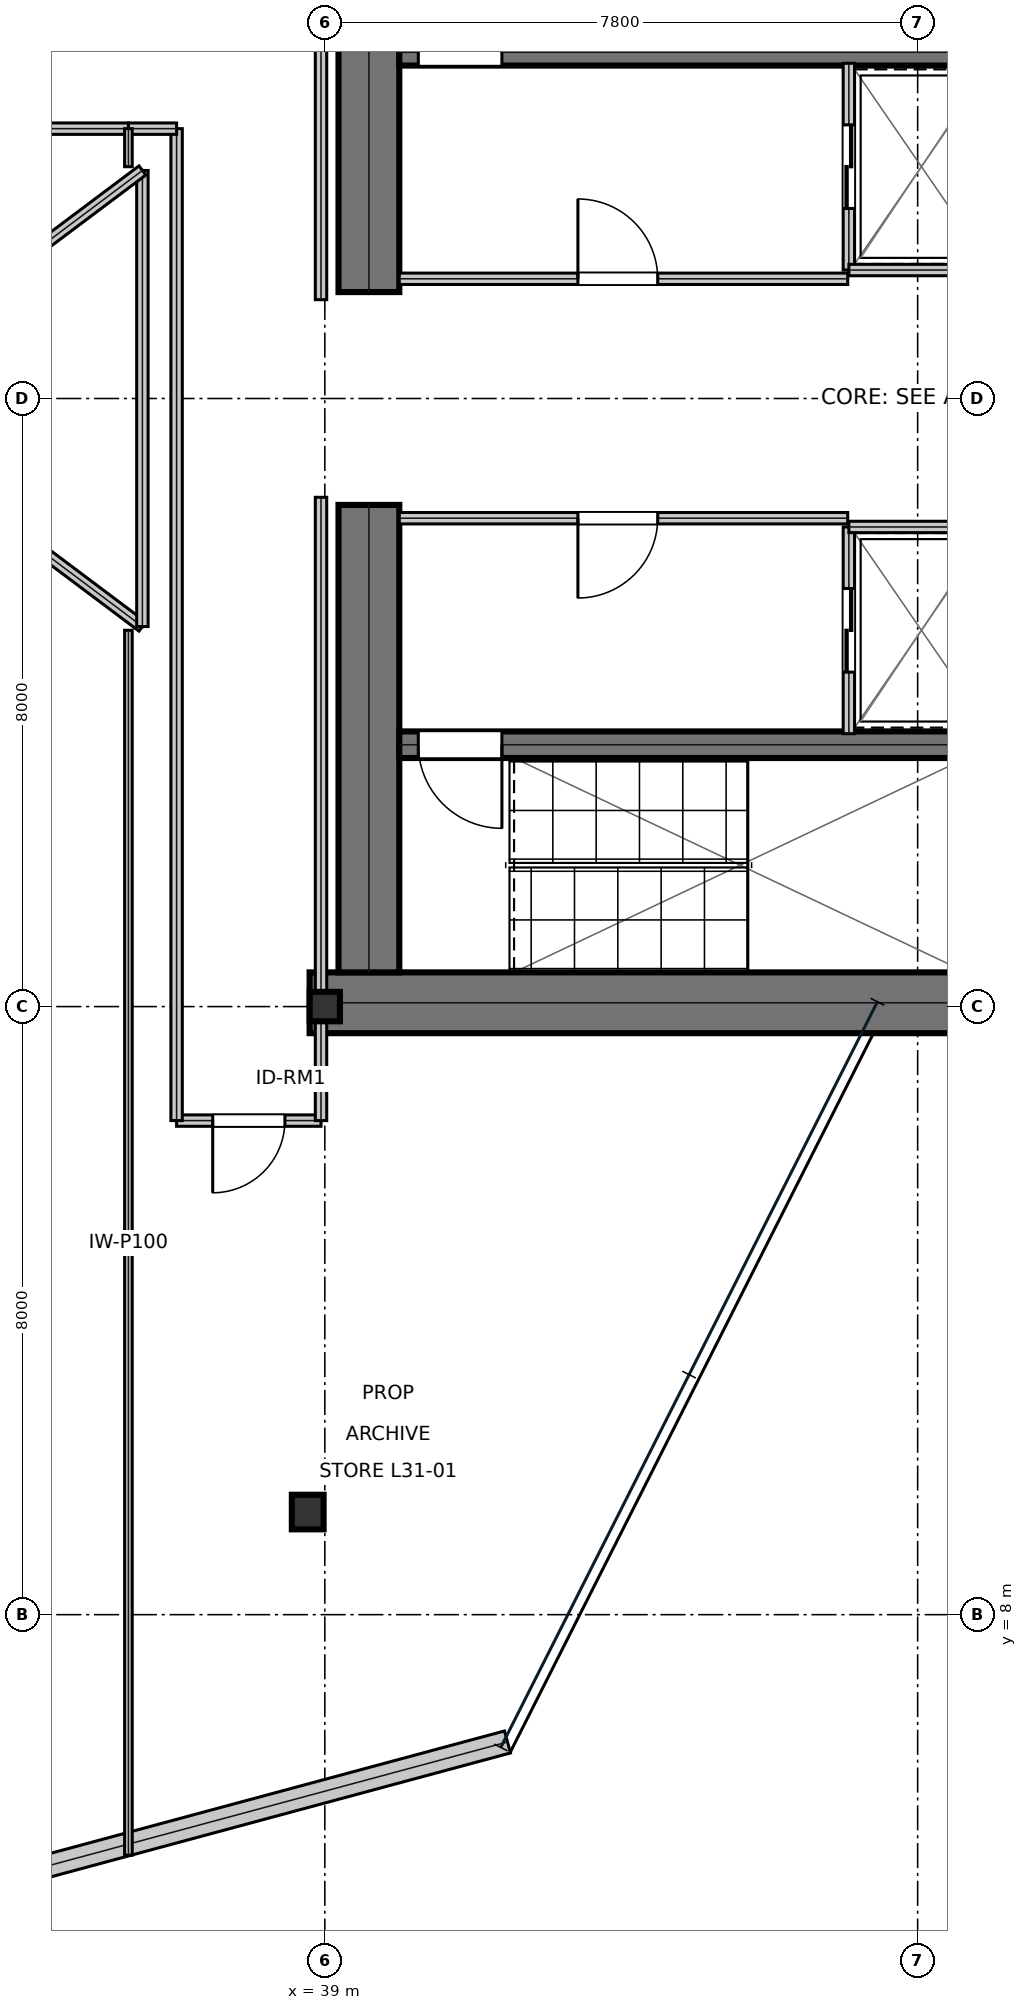
"""IFC4 building model, lengths in metres.
Left out: names, types, materials, properties, quantities, classifications, styles, units other than length and angle.
Written with IfcOpenShell. Run it as: python <this file> out.ifc"""

import sys

from ifc_helpers import new_model, si_unit, direction, frame, frame_2d, origin, origin_2d, place, context, subcontext, project, spatial, rectangle, i_section, extrude, element, fill, save


model = new_model("IFC4")
c1 = context("Model", 3, precision=1e-05, world=origin(), true_north=direction((0.0, 1.0)))
c2 = subcontext(c1, "Body", "Model", "MODEL_VIEW")
j1 = project(units=[si_unit("LENGTHUNIT", "METRE"), si_unit("PLANEANGLEUNIT", "RADIAN")], contexts=[c1])
p1 = place(None, origin())
s1 = spatial("IfcSite", under=j1, at=p1, CompositionType="ELEMENT")
p2 = place(p1, origin())
s2 = spatial("IfcBuilding", under=s1, at=p2, CompositionType="ELEMENT")
p3 = place(p2, frame((0.0, 0.0, 137.1)))
s3 = spatial("IfcBuildingStorey", under=s2, at=p3, CompositionType="ELEMENT", Elevation=137.1)
p4 = place(p3, frame((38.8, 16.05, 0.0), z_axis=(0.0, 0.0, 1.0), x_axis=(1.0, 0.0, 0.0)))
e1 = element("IfcWall", 1, at=p4, inside=s3, PredefinedType="SHEAR", context=c2, shape_type="SweptSolid", body=[
    extrude(rectangle(XDim=16.0, YDim=0.8, at=frame_2d((8.0, 0.0))), origin(), (0.0, 0.0, 1.0), 3.81),
])
for number, where, z_axis, x_axis in (
    (2, (39.58, 16.45, 0.0), (0.0, 0.0, 1.0), (0.0, 1.0, 0.0)),
    (3, (39.58, 25.4, 0.0), (0.0, 0.0, 1.0), (0.0, 1.0, 0.0)),
):
    element("IfcWall", number, at=place(p3, frame(where, z_axis=z_axis, x_axis=x_axis)), inside=s3, PredefinedType="SHEAR", context=c2, shape_type="SweptSolid", body=[
        extrude(rectangle(XDim=6.15, YDim=0.8, at=frame_2d((3.075, 0.0))), origin(), (0.0, 0.0, 1.0), 3.81),
    ])
p5 = place(p3, frame((39.98, 28.555, 0.0), z_axis=(0.0, 0.0, 1.0), x_axis=(1.0, 0.0, 0.0)))
e4 = element("IfcWall", 4, at=p5, inside=s3, PredefinedType="SHEAR", context=c2, shape_type="SweptSolid", body=[
    extrude(rectangle(XDim=7.71, YDim=0.35, at=frame_2d((3.855, 0.0))), origin(), (0.0, 0.0, 1.0), 3.81),
])
p6 = place(p5, frame((0.25, 0.0, 0.0)))
e5 = element("IfcOpeningElement", 5, at=p6, cuts=e4, PredefinedType="OPENING", context=c2, shape_type="SweptSolid", body=[
    extrude(rectangle(XDim=1.1, YDim=2.15, at=frame_2d((0.55, 1.075))), frame((0.0, 0.185, 0.0), z_axis=(0.0, -1.0, 0.0), x_axis=(1.0, 0.0, 0.0)), (0.0, 0.0, 1.0), 0.37),
])
p7 = place(p3, frame((39.98, 19.445, 0.0), z_axis=(0.0, 0.0, 1.0), x_axis=(1.0, 0.0, 0.0)))
e6 = element("IfcWall", 6, at=p7, inside=s3, PredefinedType="SHEAR", context=c2, shape_type="SweptSolid", body=[
    extrude(rectangle(XDim=7.71, YDim=0.35, at=frame_2d((3.855, 0.0))), origin(), (0.0, 0.0, 1.0), 3.81),
])
p8 = place(p7, frame((0.25, 0.0, 0.0)))
e7 = element("IfcOpeningElement", 7, at=p8, cuts=e6, PredefinedType="OPENING", context=c2, shape_type="SweptSolid", body=[
    extrude(rectangle(XDim=1.1, YDim=2.15, at=frame_2d((0.55, 1.075))), frame((0.0, 0.185, 0.0), z_axis=(0.0, -1.0, 0.0), x_axis=(1.0, 0.0, 0.0)), (0.0, 0.0, 1.0), 0.37),
])
p9 = place(p3, frame((39.0, 16.0, 0.0), z_axis=(0.0, 0.0, 1.0), x_axis=(1.0, 0.0, 0.0)))
e8 = element("IfcColumn", 8, at=p9, inside=s3, PredefinedType="COLUMN", context=c2, shape_type="SweptSolid", body=[
    extrude(i_section(OverallWidth=0.398, OverallDepth=0.387, WebThickness=0.021, FlangeThickness=0.033, at=origin_2d()), origin(), (0.0, 0.0, 1.0), 4.044),
])
p10 = place(p3, frame((38.775, 9.35, 0.016), z_axis=(-0.006193166635, 0.037280434452, 0.9992856518), x_axis=(-0.986480631929, -0.163877889995, 0.0)))
e9 = element("IfcColumn", 9, at=p10, inside=s3, PredefinedType="COLUMN", context=c2, shape_type="SweptSolid", body=[
    extrude(i_section(OverallWidth=0.418, OverallDepth=0.455, WebThickness=0.042, FlangeThickness=0.068, at=origin_2d()), origin(), (0.0, 0.0, 1.0), 4.021),
])
p11 = place(p3, frame((35.079, 4.62, 0.0), z_axis=(0.0, 0.0, 1.0), x_axis=(0.965531145086, 0.260287548434, 0.0)))
e10 = element("IfcWall", 10, at=p11, inside=s3, PredefinedType="STANDARD", context=c2, shape_type="SweptSolid", body=[
    extrude(rectangle(XDim=6.551, YDim=0.3, at=frame_2d((3.275, 0.0))), origin(), (0.0, 0.0, 1.0), 3.81),
])
p12 = place(p3, frame((39.98, 25.575, 0.0), z_axis=(0.0, 0.0, 1.0), x_axis=(1.0, 0.0, 0.0)))
e11 = element("IfcWall", 11, at=p12, inside=s3, PredefinedType="PARTITIONING", context=c2, shape_type="SweptSolid", body=[
    extrude(rectangle(XDim=5.9, YDim=0.15, at=frame_2d((2.95, 0.0))), origin(), (0.0, 0.0, 1.0), 3.81),
])
p13 = place(p12, frame((2.35, 0.0, 0.0)))
e12 = element("IfcOpeningElement", 12, at=p13, cuts=e11, PredefinedType="OPENING", context=c2, shape_type="SweptSolid", body=[
    extrude(rectangle(XDim=1.05, YDim=2.15, at=frame_2d((0.525, 1.075))), frame((0.0, 0.085, 0.0), z_axis=(0.0, -1.0, 0.0), x_axis=(1.0, 0.0, 0.0)), (0.0, 0.0, 1.0), 0.17),
])
p14 = place(p3, frame((39.98, 22.425, 0.0), z_axis=(0.0, 0.0, 1.0), x_axis=(1.0, 0.0, 0.0)))
e13 = element("IfcWall", 13, at=p14, inside=s3, PredefinedType="PARTITIONING", context=c2, shape_type="SweptSolid", body=[
    extrude(rectangle(XDim=5.9, YDim=0.15, at=frame_2d((2.95, 0.0))), origin(), (0.0, 0.0, 1.0), 3.81),
])
p15 = place(p14, frame((2.35, 0.0, 0.0)))
e14 = element("IfcOpeningElement", 14, at=p15, cuts=e13, PredefinedType="OPENING", context=c2, shape_type="SweptSolid", body=[
    extrude(rectangle(XDim=1.05, YDim=2.15, at=frame_2d((0.525, 1.075))), frame((0.0, 0.085, 0.0), z_axis=(0.0, -1.0, 0.0), x_axis=(1.0, 0.0, 0.0)), (0.0, 0.0, 1.0), 0.17),
])
p16 = place(p3, frame((45.895, 25.69, 0.0), z_axis=(0.0, 0.0, 1.0), x_axis=(0.0, 1.0, 0.0)))
e15 = element("IfcWall", 15, at=p16, inside=s3, PredefinedType="PARTITIONING", context=c2, shape_type="SweptSolid", body=[
    extrude(rectangle(XDim=2.72, YDim=0.15, at=frame_2d((1.36, 0.0))), origin(), (0.0, 0.0, 1.0), 3.81),
])
p17 = place(p16, frame((0.81, 0.0, 0.0)))
e16 = element("IfcOpeningElement", 16, at=p17, cuts=e15, PredefinedType="OPENING", context=c2, shape_type="SweptSolid", body=[
    extrude(rectangle(XDim=1.1, YDim=2.15, at=frame_2d((0.55, 1.075))), frame((0.0, 0.085, 0.0), z_axis=(0.0, -1.0, 0.0), x_axis=(1.0, 0.0, 0.0)), (0.0, 0.0, 1.0), 0.17),
])
p18 = place(p3, frame((45.895, 25.69, 0.0), z_axis=(0.0, 0.0, 1.0), x_axis=(1.0, 0.0, 0.0)))
e17 = element("IfcWall", 17, at=p18, inside=s3, PredefinedType="PARTITIONING", context=c2, shape_type="SweptSolid", body=[
    extrude(rectangle(XDim=1.915, YDim=0.15, at=frame_2d((0.958, 0.0))), origin(), (0.0, 0.0, 1.0), 3.81),
])
p19 = place(p3, frame((45.895, 19.59, 0.0), z_axis=(0.0, 0.0, 1.0), x_axis=(0.0, 1.0, 0.0)))
e18 = element("IfcWall", 18, at=p19, inside=s3, PredefinedType="PARTITIONING", context=c2, shape_type="SweptSolid", body=[
    extrude(rectangle(XDim=2.72, YDim=0.15, at=frame_2d((1.36, 0.0))), origin(), (0.0, 0.0, 1.0), 3.81),
])
p20 = place(p19, frame((0.81, 0.0, 0.0)))
e19 = element("IfcOpeningElement", 19, at=p20, cuts=e18, PredefinedType="OPENING", context=c2, shape_type="SweptSolid", body=[
    extrude(rectangle(XDim=1.1, YDim=2.15, at=frame_2d((0.55, 1.075))), frame((0.0, 0.085, 0.0), z_axis=(0.0, -1.0, 0.0), x_axis=(1.0, 0.0, 0.0)), (0.0, 0.0, 1.0), 0.17),
])
p21 = place(p3, frame((45.895, 22.31, 0.0), z_axis=(0.0, 0.0, 1.0), x_axis=(1.0, 0.0, 0.0)))
e20 = element("IfcWall", 20, at=p21, inside=s3, PredefinedType="PARTITIONING", context=c2, shape_type="SweptSolid", body=[
    extrude(rectangle(XDim=1.915, YDim=0.15, at=frame_2d((0.958, 0.0))), origin(), (0.0, 0.0, 1.0), 3.81),
])
p22 = place(p3, frame((37.05, 14.5, 0.0), z_axis=(0.0, 0.0, 1.0), x_axis=(1.0, 0.0, 0.0)))
e21 = element("IfcWall", 21, at=p22, inside=s3, PredefinedType="PARTITIONING", context=c2, shape_type="SweptSolid", body=[
    extrude(rectangle(XDim=1.9, YDim=0.15, at=frame_2d((0.95, 0.0))), origin(), (0.0, 0.0, 1.0), 3.19),
])
p23 = place(p22, frame((0.475, 0.0, 0.0)))
e22 = element("IfcOpeningElement", 22, at=p23, cuts=e21, PredefinedType="OPENING", context=c2, shape_type="SweptSolid", body=[
    extrude(rectangle(XDim=0.95, YDim=2.15, at=frame_2d((0.475, 1.075))), frame((0.0, 0.085, 0.0), z_axis=(0.0, -1.0, 0.0), x_axis=(1.0, 0.0, 0.0)), (0.0, 0.0, 1.0), 0.17),
])
p24 = place(p3, frame((37.05, 14.5, 0.0), z_axis=(0.0, 0.0, 1.0), x_axis=(0.0, 1.0, 0.0)))
e23 = element("IfcWall", 23, at=p24, inside=s3, PredefinedType="PARTITIONING", context=c2, shape_type="SweptSolid", body=[
    extrude(rectangle(XDim=13.05, YDim=0.15, at=frame_2d((6.525, 0.0))), origin(), (0.0, 0.0, 1.0), 3.19),
])
p25 = place(p3, frame((38.95, 14.5, 0.0), z_axis=(0.0, 0.0, 1.0), x_axis=(0.0, 1.0, 0.0)))
e24 = element("IfcWall", 24, at=p25, inside=s3, PredefinedType="PARTITIONING", context=c2, shape_type="SweptSolid", body=[
    extrude(rectangle(XDim=8.2, YDim=0.15, at=frame_2d((4.1, 0.0))), origin(), (0.0, 0.0, 1.0), 3.19),
])
p26 = place(p3, frame((36.416, 27.55, 0.0), z_axis=(0.0, 0.0, 1.0), x_axis=(1.0, 0.0, 0.0)))
e25 = element("IfcWall", 25, at=p26, inside=s3, PredefinedType="PARTITIONING", context=c2, shape_type="SweptSolid", body=[
    extrude(rectangle(XDim=0.634, YDim=0.15, at=frame_2d((0.317, 0.0))), origin(), (0.0, 0.0, 1.0), 3.443),
])
p27 = place(p3, frame((29.4, 27.55, 0.0), z_axis=(0.0, 0.0, 1.0), x_axis=(1.0, 0.0, 0.0)))
e26 = element("IfcWall", 26, at=p27, inside=s3, PredefinedType="PARTITIONING", context=c2, shape_type="SweptSolid", body=[
    extrude(rectangle(XDim=7.016, YDim=0.15, at=frame_2d((3.508, 0.0))), origin(), (0.0, 0.0, 1.0), 3.19),
])
p28 = place(p3, frame((38.95, 25.3, 0.0), z_axis=(0.0, 0.0, 1.0), x_axis=(0.0, 1.0, 0.0)))
e27 = element("IfcWall", 27, at=p28, inside=s3, PredefinedType="PARTITIONING", context=c2, shape_type="SweptSolid", body=[
    extrude(rectangle(XDim=8.2, YDim=0.15, at=frame_2d((4.1, 0.0))), origin(), (0.0, 0.0, 1.0), 3.19),
])
p29 = place(p3, frame((36.416, 4.836, 0.0), z_axis=(0.0, 0.0, 1.0), x_axis=(0.0, 1.0, 0.0)))
e28 = element("IfcWall", 28, at=p29, inside=s3, PredefinedType="PARTITIONING", context=c2, shape_type="SweptSolid", body=[
    extrude(rectangle(XDim=16.115, YDim=0.1, at=frame_2d((8.057, 0.0))), origin(), (0.0, 0.0, 1.0), 3.19),
])
p30 = place(p3, frame((36.416, 27.05, 0.0), z_axis=(0.0, 0.0, 1.0), x_axis=(0.0, 1.0, 0.0)))
e29 = element("IfcWall", 29, at=p30, inside=s3, PredefinedType="PARTITIONING", context=c2, shape_type="SweptSolid", body=[
    extrude(rectangle(XDim=0.5, YDim=0.1, at=frame_2d((0.25, 0.0))), origin(), (0.0, 0.0, 1.0), 3.81),
])
p31 = place(p3, frame((32.6, 24.0, 0.0), z_axis=(0.0, 0.0, 1.0), x_axis=(0.8, -0.6, 0.0)))
e30 = element("IfcWall", 30, at=p31, inside=s3, PredefinedType="MOVABLE", context=c2, shape_type="SweptSolid", body=[
    extrude(rectangle(XDim=5.0, YDim=0.15, at=frame_2d((2.5, 0.0))), origin(), (0.0, 0.0, 1.0), 3.81),
])
p32 = place(p3, frame((36.6, 21.0, 0.0), z_axis=(0.0, 0.0, 1.0), x_axis=(0.0, 1.0, 0.0)))
e31 = element("IfcWall", 31, at=p32, inside=s3, PredefinedType="MOVABLE", context=c2, shape_type="SweptSolid", body=[
    extrude(rectangle(XDim=6.0, YDim=0.15, at=frame_2d((3.0, 0.0))), origin(), (0.0, 0.0, 1.0), 3.81),
])
p33 = place(p3, frame((36.6, 27.0, 0.0), z_axis=(0.0, 0.0, 1.0), x_axis=(-0.8, -0.6, 0.0)))
e32 = element("IfcWall", 32, at=p33, inside=s3, PredefinedType="MOVABLE", context=c2, shape_type="SweptSolid", body=[
    extrude(rectangle(XDim=5.0, YDim=0.15, at=frame_2d((2.5, 0.0))), origin(), (0.0, 0.0, 1.0), 3.81),
])
p34 = place(p13, origin())
e33 = element("IfcDoor", 33, at=p34, inside=s3, OperationType="SINGLE_SWING_LEFT", PredefinedType="DOOR", context=c2, shape_type="SweptSolid", body=[
    extrude(rectangle(XDim=1.05, YDim=2.15, at=frame_2d((0.525, 1.075))), frame((0.0, 0.025, 0.0), z_axis=(0.0, -1.0, 0.0), x_axis=(1.0, 0.0, 0.0)), (0.0, 0.0, 1.0), 0.05),
])
fill(e12, e33)
p35 = place(p15, frame((1.05, 0.0, 0.0), z_axis=(0.0, 0.0, 1.0), x_axis=(-1.0, 0.0, 0.0)))
e34 = element("IfcDoor", 34, at=p35, inside=s3, OperationType="SINGLE_SWING_RIGHT", PredefinedType="DOOR", context=c2, shape_type="SweptSolid", body=[
    extrude(rectangle(XDim=1.05, YDim=2.15, at=frame_2d((0.525, 1.075))), frame((0.0, 0.025, 0.0), z_axis=(0.0, -1.0, 0.0), x_axis=(1.0, 0.0, 0.0)), (0.0, 0.0, 1.0), 0.05),
])
fill(e14, e34)
p36 = place(p17, frame((1.1, 0.0, 0.0), z_axis=(0.0, 0.0, 1.0), x_axis=(-1.0, 0.0, 0.0)))
e35 = element("IfcDoor", 35, at=p36, inside=s3, OperationType="DOUBLE_DOOR_SLIDING", PredefinedType="DOOR", context=c2, shape_type="SweptSolid", body=[
    extrude(rectangle(XDim=1.1, YDim=2.15, at=frame_2d((0.55, 1.075))), frame((0.0, 0.025, 0.0), z_axis=(0.0, -1.0, 0.0), x_axis=(1.0, 0.0, 0.0)), (0.0, 0.0, 1.0), 0.05),
])
fill(e16, e35)
p37 = place(p20, frame((1.1, 0.0, 0.0), z_axis=(0.0, 0.0, 1.0), x_axis=(-1.0, 0.0, 0.0)))
e36 = element("IfcDoor", 36, at=p37, inside=s3, OperationType="DOUBLE_DOOR_SLIDING", PredefinedType="DOOR", context=c2, shape_type="SweptSolid", body=[
    extrude(rectangle(XDim=1.1, YDim=2.15, at=frame_2d((0.55, 1.075))), frame((0.0, 0.025, 0.0), z_axis=(0.0, -1.0, 0.0), x_axis=(1.0, 0.0, 0.0)), (0.0, 0.0, 1.0), 0.05),
])
fill(e19, e36)
p38 = place(p23, frame((0.95, 0.0, 0.0), z_axis=(0.0, 0.0, 1.0), x_axis=(-1.0, 0.0, 0.0)))
e37 = element("IfcDoor", 37, at=p38, inside=s3, OperationType="SINGLE_SWING_RIGHT", PredefinedType="DOOR", context=c2, shape_type="SweptSolid", body=[
    extrude(rectangle(XDim=0.95, YDim=2.15, at=frame_2d((0.475, 1.075))), frame((0.0, 0.025, 0.0), z_axis=(0.0, -1.0, 0.0), x_axis=(1.0, 0.0, 0.0)), (0.0, 0.0, 1.0), 0.05),
])
fill(e22, e37)
p39 = place(p6, origin())
e38 = element("IfcDoor", 38, at=p39, inside=s3, OperationType="SINGLE_SWING_RIGHT", PredefinedType="DOOR", context=c2, shape_type="SweptSolid", body=[
    extrude(rectangle(XDim=1.1, YDim=2.15, at=frame_2d((0.55, 1.075))), frame((0.0, 0.025, 0.0), z_axis=(0.0, -1.0, 0.0), x_axis=(1.0, 0.0, 0.0)), (0.0, 0.0, 1.0), 0.05),
])
fill(e5, e38)
p40 = place(p8, frame((1.1, 0.0, 0.0), z_axis=(0.0, 0.0, 1.0), x_axis=(-1.0, 0.0, 0.0)))
e39 = element("IfcDoor", 39, at=p40, inside=s3, OperationType="SINGLE_SWING_LEFT", PredefinedType="DOOR", context=c2, shape_type="SweptSolid", body=[
    extrude(rectangle(XDim=1.1, YDim=2.15, at=frame_2d((0.55, 1.075))), frame((0.0, 0.025, 0.0), z_axis=(0.0, -1.0, 0.0), x_axis=(1.0, 0.0, 0.0)), (0.0, 0.0, 1.0), 0.05),
])
fill(e7, e39)
save(model, sys.argv[1])
